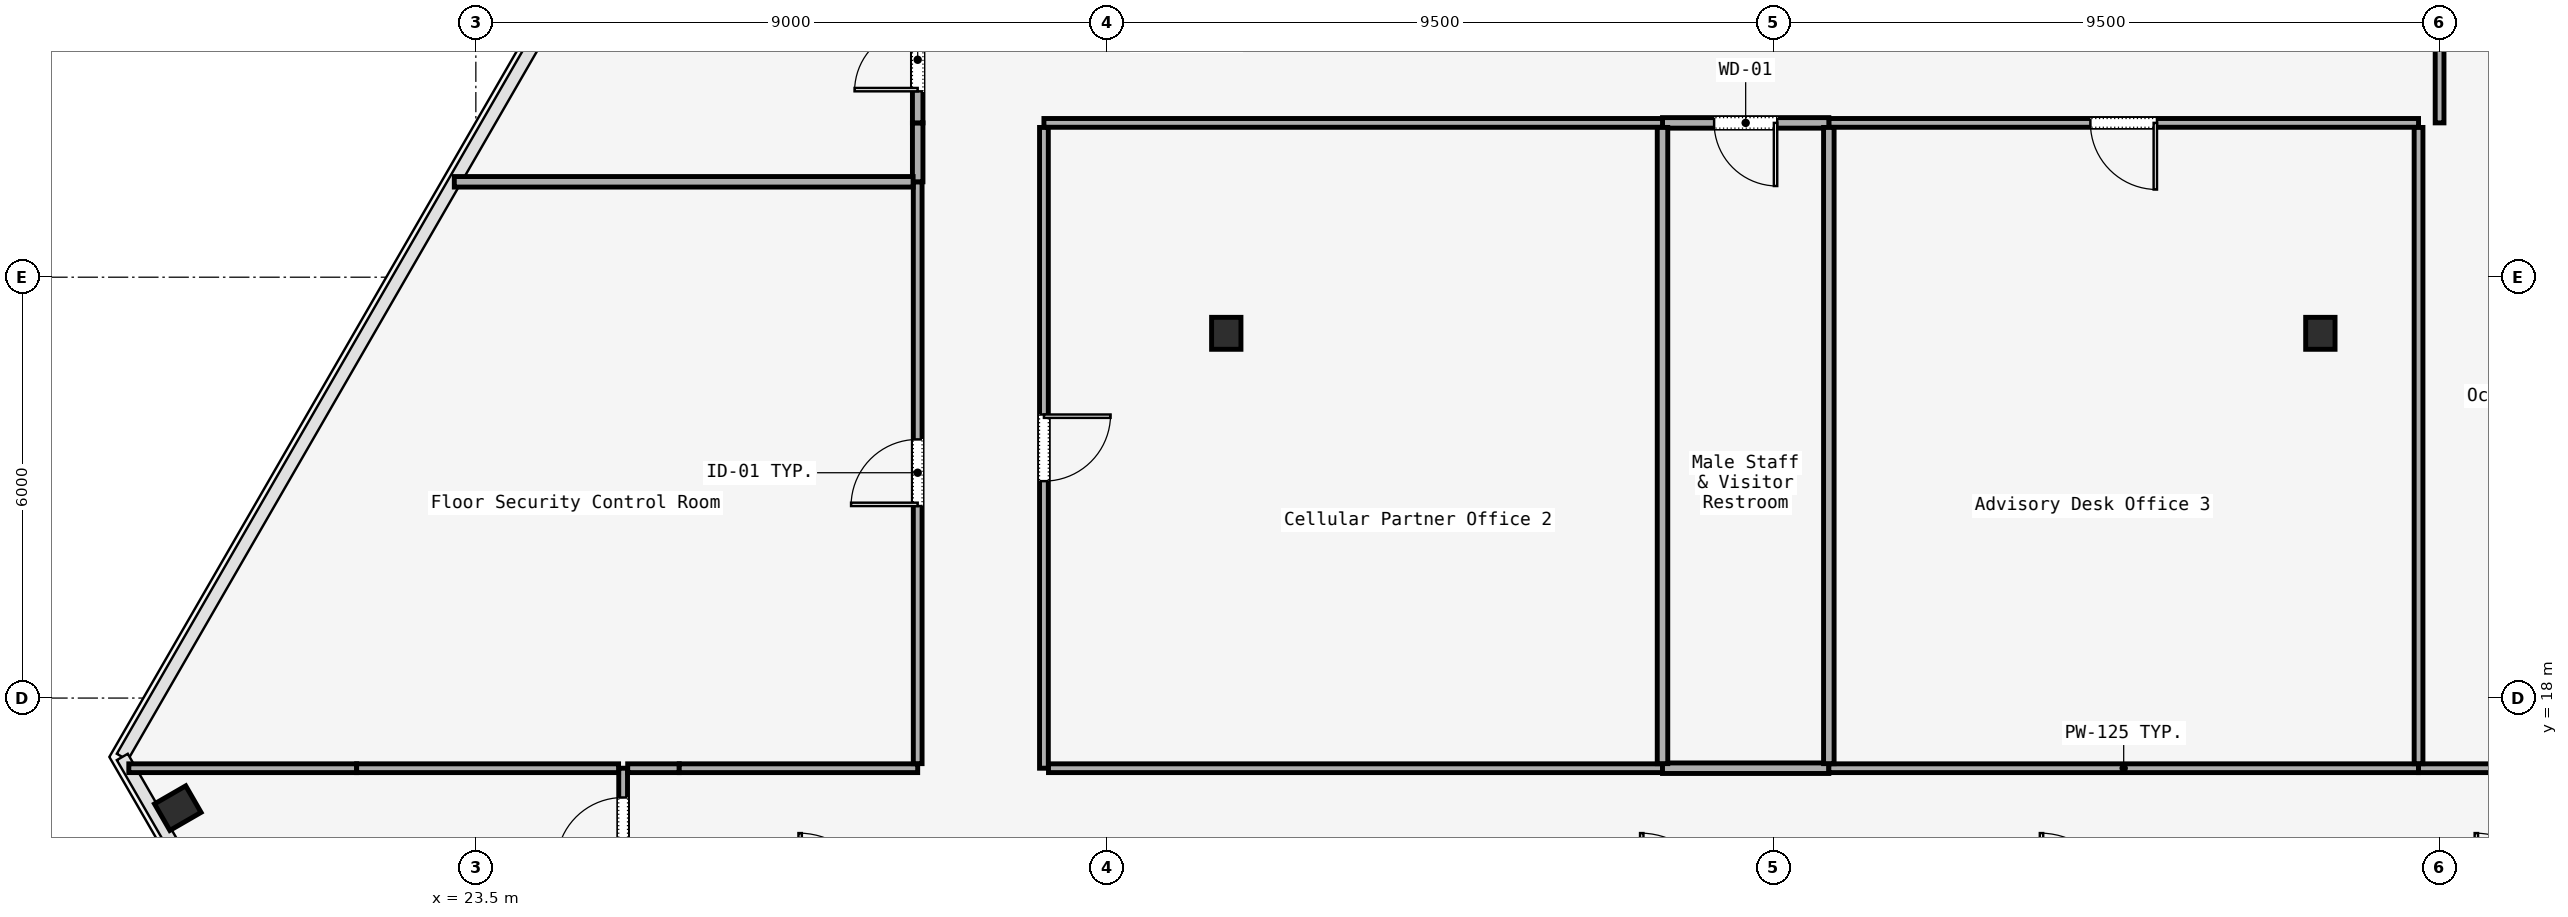
"""IFC4 building model, lengths in metres.
Left out: names, types, materials, properties, quantities, classifications, styles, units other than length and angle.
Written with IfcOpenShell. Run it as: python <this file> out.ifc"""

import sys

from ifc_helpers import new_model, si_unit, direction, frame, frame_2d, origin, origin_2d, place, context, subcontext, project, spatial, rectangle, i_section, extrude, element, fill, save


model = new_model("IFC4")
c1 = context("Model", 3, precision=1e-05, world=origin(), true_north=direction((0.0, 1.0)))
c2 = subcontext(c1, "Body", "Model", "MODEL_VIEW")
j1 = project(units=[si_unit("LENGTHUNIT", "METRE"), si_unit("PLANEANGLEUNIT", "RADIAN")], contexts=[c1])
p1 = place(None, origin())
s1 = spatial("IfcSite", under=j1, at=p1, CompositionType="ELEMENT")
p2 = place(p1, origin())
s2 = spatial("IfcBuilding", under=s1, at=p2, CompositionType="ELEMENT")
p3 = place(p2, frame((0.0, 0.0, 96.8)))
s3 = spatial("IfcBuildingStorey", under=s2, at=p3, CompositionType="ELEMENT", Elevation=96.8)
for number, where, z_axis, x_axis in (
    (1, (34.2, 23.2, 0.0), (0.0, 0.0, 1.0), (1.0, 0.0, 0.0)),
    (2, (49.8, 23.2, 0.0), (0.0, 0.0, 1.0), (1.0, 0.0, 0.0)),
):
    element("IfcColumn", number, at=place(p3, frame(where, z_axis=z_axis, x_axis=x_axis)), inside=s3, PredefinedType="COLUMN", context=c2, shape_type="SweptSolid", body=[
        extrude(i_section(OverallWidth=0.418, OverallDepth=0.456, WebThickness=0.042, FlangeThickness=0.067, FilletRadius=0.015, at=origin_2d()), origin(), (0.0, 0.0, 1.0), 3.58),
    ])
p4 = place(p3, frame((19.25, 16.431, 0.0), z_axis=(-0.007813879948, -0.085544998738, 0.996303666796), x_axis=(-0.419441460984, 0.904729024715, 0.074392557737)))
e3 = element("IfcColumn", 3, at=p4, inside=s3, PredefinedType="COLUMN", context=c2, shape_type="SweptSolid", body=[
    extrude(i_section(OverallWidth=0.437, OverallDepth=0.514, WebThickness=0.061, FlangeThickness=0.077, FilletRadius=0.015, at=origin_2d()), origin(), (0.0, 0.0, 1.0), 3.593),
])
p5 = place(p3, frame((25.6, 15.215, 0.0), z_axis=(0.0, 0.0, 1.0), x_axis=(0.0, 1.0, 0.0)))
e4 = element("IfcWall", 4, at=p5, inside=s3, PredefinedType="PARTITIONING", context=c2, shape_type="SweptSolid", body=[
    extrude(rectangle(XDim=1.785, YDim=0.125, at=frame_2d((0.893, 0.0))), origin(), (0.0, 0.0, 1.0), 2.95),
])
p6 = place(p5, frame((0.417, 0.0, 0.0)))
e5 = element("IfcOpeningElement", 5, at=p6, cuts=e4, PredefinedType="OPENING", context=c2, shape_type="SweptSolid", body=[
    extrude(rectangle(XDim=0.95, YDim=2.2, at=frame_2d((0.475, 1.1))), frame((0.0, 0.062, 0.0), z_axis=(0.0, -1.0, 0.0), x_axis=(1.0, 0.0, 0.0)), (0.0, 0.0, 1.0), 0.125),
])
p7 = place(p3, frame((25.665, 17.0, 0.0), z_axis=(0.0, 0.0, 1.0), x_axis=(1.0, 0.0, 0.0)))
e6 = element("IfcWall", 6, at=p7, inside=s3, PredefinedType="PARTITIONING", context=c2, shape_type="SweptSolid", body=[
    extrude(rectangle(XDim=0.735, YDim=0.125, at=frame_2d((0.367, 0.0))), origin(), (0.0, 0.0, 1.0), 2.95),
])
p8 = place(p3, frame((26.4, 17.0, 0.0), z_axis=(0.0, 0.0, 1.0), x_axis=(1.0, 0.0, 0.0)))
e7 = element("IfcWall", 7, at=p8, inside=s3, PredefinedType="PARTITIONING", context=c2, shape_type="SweptSolid", body=[
    extrude(rectangle(XDim=3.4, YDim=0.125, at=frame_2d((1.7, 0.0))), origin(), (0.0, 0.0, 1.0), 2.95),
])
p9 = place(p3, frame((29.8, 17.065, 0.0), z_axis=(0.0, 0.0, 1.0), x_axis=(0.0, 1.0, 0.0)))
e8 = element("IfcWall", 8, at=p9, inside=s3, PredefinedType="PARTITIONING", context=c2, shape_type="SweptSolid", body=[
    extrude(rectangle(XDim=8.295, YDim=0.125, at=frame_2d((4.147, 0.0))), origin(), (0.0, 0.0, 1.0), 2.95),
])
p10 = place(p9, frame((3.673, 0.0, 0.0)))
e9 = element("IfcOpeningElement", 9, at=p10, cuts=e8, PredefinedType="OPENING", context=c2, shape_type="SweptSolid", body=[
    extrude(rectangle(XDim=0.95, YDim=2.2, at=frame_2d((0.475, 1.1))), frame((0.0, 0.062, 0.0), z_axis=(0.0, -1.0, 0.0), x_axis=(1.0, 0.0, 0.0)), (0.0, 0.0, 1.0), 0.125),
])
p11 = place(p3, frame((29.8, 25.36, 0.0), z_axis=(0.0, 0.0, 1.0), x_axis=(0.0, 1.0, 0.0)))
e10 = element("IfcWall", 10, at=p11, inside=s3, PredefinedType="PARTITIONING", context=c2, shape_type="SweptSolid", body=[
    extrude(rectangle(XDim=0.84, YDim=0.15, at=frame_2d((0.42, 0.0))), origin(), (0.0, 0.0, 1.0), 2.95),
])
p12 = place(p3, frame((29.8, 26.2, 0.0), z_axis=(0.0, 0.0, 1.0), x_axis=(0.0, 1.0, 0.0)))
e11 = element("IfcWall", 11, at=p12, inside=s3, PredefinedType="PARTITIONING", context=c2, shape_type="SweptSolid", body=[
    extrude(rectangle(XDim=1.8, YDim=0.15, at=frame_2d((0.9, 0.0))), origin(), (0.0, 0.0, 1.0), 2.95),
])
p13 = place(p12, frame((0.45, 0.0, 0.0)))
e12 = element("IfcOpeningElement", 12, at=p13, cuts=e11, PredefinedType="OPENING", context=c2, shape_type="SweptSolid", body=[
    extrude(rectangle(XDim=0.9, YDim=2.15, at=frame_2d((0.45, 1.075))), frame((0.0, 0.075, 0.0), z_axis=(0.0, -1.0, 0.0), x_axis=(1.0, 0.0, 0.0)), (0.0, 0.0, 1.0), 0.15),
])
p14 = place(p3, frame((51.5, 27.935, 0.0), z_axis=(0.0, 0.0, 1.0), x_axis=(0.0, -1.0, 0.0)))
e13 = element("IfcWall", 13, at=p14, inside=s3, PredefinedType="PARTITIONING", context=c2, shape_type="SweptSolid", body=[
    extrude(rectangle(XDim=1.735, YDim=0.125, at=frame_2d((0.868, 0.0))), origin(), (0.0, 0.0, 1.0), 2.95),
])
p15 = place(p3, frame((51.2, 26.2, 0.0), z_axis=(0.0, 0.0, 1.0), x_axis=(-1.0, 0.0, 0.0)))
e14 = element("IfcWall", 14, at=p15, inside=s3, PredefinedType="PARTITIONING", context=c2, shape_type="SweptSolid", body=[
    extrude(rectangle(XDim=8.408, YDim=0.125, at=frame_2d((4.204, 0.0))), origin(), (0.0, 0.0, 1.0), 2.95),
])
p16 = place(p15, frame((3.729, 0.0, 0.0)))
e15 = element("IfcOpeningElement", 15, at=p16, cuts=e14, PredefinedType="OPENING", context=c2, shape_type="SweptSolid", body=[
    extrude(rectangle(XDim=0.95, YDim=2.2, at=frame_2d((0.475, 1.1))), frame((0.0, 0.062, 0.0), z_axis=(0.0, -1.0, 0.0), x_axis=(1.0, 0.0, 0.0)), (0.0, 0.0, 1.0), 0.125),
])
p17 = place(p3, frame((42.792, 26.2, 0.0), z_axis=(0.0, 0.0, 1.0), x_axis=(-1.0, 0.0, 0.0)))
e16 = element("IfcWall", 16, at=p17, inside=s3, PredefinedType="PARTITIONING", context=c2, shape_type="SweptSolid", body=[
    extrude(rectangle(XDim=2.372, YDim=0.15, at=frame_2d((1.186, 0.0))), origin(), (0.0, 0.0, 1.0), 2.95),
])
p18 = place(p17, frame((0.736, 0.0, 0.0)))
e17 = element("IfcOpeningElement", 17, at=p18, cuts=e16, PredefinedType="OPENING", context=c2, shape_type="SweptSolid", body=[
    extrude(rectangle(XDim=0.9, YDim=2.15, at=frame_2d((0.45, 1.075))), frame((0.0, 0.075, 0.0), z_axis=(0.0, -1.0, 0.0), x_axis=(1.0, 0.0, 0.0)), (0.0, 0.0, 1.0), 0.15),
])
p19 = place(p3, frame((40.42, 26.2, 0.0), z_axis=(0.0, 0.0, 1.0), x_axis=(-1.0, 0.0, 0.0)))
e18 = element("IfcWall", 18, at=p19, inside=s3, PredefinedType="PARTITIONING", context=c2, shape_type="SweptSolid", body=[
    extrude(rectangle(XDim=8.82, YDim=0.125, at=frame_2d((4.41, 0.0))), origin(), (0.0, 0.0, 1.0), 2.95),
])
p20 = place(p3, frame((31.6, 26.135, 0.0), z_axis=(0.0, 0.0, 1.0), x_axis=(0.0, -1.0, 0.0)))
e19 = element("IfcWall", 19, at=p20, inside=s3, PredefinedType="PARTITIONING", context=c2, shape_type="SweptSolid", body=[
    extrude(rectangle(XDim=9.135, YDim=0.125, at=frame_2d((4.567, 0.0))), origin(), (0.0, 0.0, 1.0), 2.95),
])
p21 = place(p20, frame((4.093, 0.0, 0.0)))
e20 = element("IfcOpeningElement", 20, at=p21, cuts=e19, PredefinedType="OPENING", context=c2, shape_type="SweptSolid", body=[
    extrude(rectangle(XDim=0.95, YDim=2.2, at=frame_2d((0.475, 1.1))), frame((0.0, 0.062, 0.0), z_axis=(0.0, -1.0, 0.0), x_axis=(1.0, 0.0, 0.0)), (0.0, 0.0, 1.0), 0.125),
])
p22 = place(p3, frame((31.665, 17.0, 0.0), z_axis=(0.0, 0.0, 1.0), x_axis=(1.0, 0.0, 0.0)))
e21 = element("IfcWall", 21, at=p22, inside=s3, PredefinedType="PARTITIONING", context=c2, shape_type="SweptSolid", body=[
    extrude(rectangle(XDim=8.755, YDim=0.125, at=frame_2d((4.377, 0.0))), origin(), (0.0, 0.0, 1.0), 2.95),
])
p23 = place(p3, frame((40.42, 17.0, 0.0), z_axis=(0.0, 0.0, 1.0), x_axis=(1.0, 0.0, 0.0)))
e22 = element("IfcWall", 22, at=p23, inside=s3, PredefinedType="PARTITIONING", context=c2, shape_type="SweptSolid", body=[
    extrude(rectangle(XDim=2.372, YDim=0.15, at=frame_2d((1.186, 0.0))), origin(), (0.0, 0.0, 1.0), 2.95),
])
p24 = place(p3, frame((42.792, 17.0, 0.0), z_axis=(0.0, 0.0, 1.0), x_axis=(1.0, 0.0, 0.0)))
e23 = element("IfcWall", 23, at=p24, inside=s3, PredefinedType="PARTITIONING", context=c2, shape_type="SweptSolid", body=[
    extrude(rectangle(XDim=8.408, YDim=0.125, at=frame_2d((4.204, 0.0))), origin(), (0.0, 0.0, 1.0), 2.95),
])
p25 = place(p3, frame((51.2, 17.0, 0.0), z_axis=(0.0, 0.0, 1.0), x_axis=(1.0, 0.0, 0.0)))
e24 = element("IfcWall", 24, at=p25, inside=s3, PredefinedType="PARTITIONING", context=c2, shape_type="SweptSolid", body=[
    extrude(rectangle(XDim=5.2, YDim=0.125, at=frame_2d((2.6, 0.0))), origin(), (0.0, 0.0, 1.0), 2.95),
])
p26 = place(p25, frame((2.125, 0.0, 0.0)))
e25 = element("IfcOpeningElement", 25, at=p26, cuts=e24, PredefinedType="OPENING", context=c2, shape_type="SweptSolid", body=[
    extrude(rectangle(XDim=0.95, YDim=2.2, at=frame_2d((0.475, 1.1))), frame((0.0, 0.062, 0.0), z_axis=(0.0, -1.0, 0.0), x_axis=(1.0, 0.0, 0.0)), (0.0, 0.0, 1.0), 0.125),
])
p27 = place(p3, frame((18.552, 17.0, 0.0), z_axis=(0.0, 0.0, 1.0), x_axis=(1.0, 0.0, 0.0)))
e26 = element("IfcWall", 26, at=p27, inside=s3, PredefinedType="PARTITIONING", context=c2, shape_type="SweptSolid", body=[
    extrude(rectangle(XDim=3.248, YDim=0.125, at=frame_2d((1.624, 0.0))), origin(), (0.0, 0.0, 1.0), 2.95),
])
p28 = place(p3, frame((21.8, 17.0, 0.0), z_axis=(0.0, 0.0, 1.0), x_axis=(1.0, 0.0, 0.0)))
e27 = element("IfcWall", 27, at=p28, inside=s3, PredefinedType="PARTITIONING", context=c2, shape_type="SweptSolid", body=[
    extrude(rectangle(XDim=3.735, YDim=0.125, at=frame_2d((1.867, 0.0))), origin(), (0.0, 0.0, 1.0), 2.95),
])
p29 = place(p3, frame((23.193, 25.36, 0.0), z_axis=(0.0, 0.0, 1.0), x_axis=(1.0, 0.0, 0.0)))
e28 = element("IfcWall", 28, at=p29, inside=s3, PredefinedType="PARTITIONING", context=c2, shape_type="SweptSolid", body=[
    extrude(rectangle(XDim=6.542, YDim=0.15, at=frame_2d((3.271, 0.0))), origin(), (0.0, 0.0, 1.0), 2.95),
])
for number, where, z_axis, x_axis in (
    (29, (40.42, 26.135, 0.0), (0.0, 0.0, 1.0), (0.0, -1.0, 0.0)),
    (30, (42.792, 26.135, 0.0), (0.0, 0.0, 1.0), (0.0, -1.0, 0.0)),
):
    element("IfcWall", number, at=place(p3, frame(where, z_axis=z_axis, x_axis=x_axis)), inside=s3, PredefinedType="PARTITIONING", context=c2, shape_type="SweptSolid", body=[
        extrude(rectangle(XDim=9.07, YDim=0.15, at=frame_2d((4.535, 0.0))), origin(), (0.0, 0.0, 1.0), 2.95),
    ])
p30 = place(p3, frame((51.2, 26.135, 0.0), z_axis=(0.0, 0.0, 1.0), x_axis=(0.0, -1.0, 0.0)))
e31 = element("IfcWall", 31, at=p30, inside=s3, PredefinedType="PARTITIONING", context=c2, shape_type="SweptSolid", body=[
    extrude(rectangle(XDim=9.07, YDim=0.125, at=frame_2d((4.535, 0.0))), origin(), (0.0, 0.0, 1.0), 2.95),
])
p31 = place(p6, origin())
e32 = element("IfcDoor", 32, at=p31, inside=s3, OperationType="SINGLE_SWING_LEFT", PredefinedType="DOOR", context=c2, shape_type="SweptSolid", body=[
    extrude(rectangle(XDim=0.95, YDim=2.2, at=frame_2d((0.475, 1.1))), frame((0.0, 0.025, 0.0), z_axis=(0.0, -1.0, 0.0), x_axis=(1.0, 0.0, 0.0)), (0.0, 0.0, 1.0), 0.05),
])
fill(e5, e32)
p32 = place(p10, origin())
e33 = element("IfcDoor", 33, at=p32, inside=s3, OperationType="SINGLE_SWING_LEFT", PredefinedType="DOOR", context=c2, shape_type="SweptSolid", body=[
    extrude(rectangle(XDim=0.95, YDim=2.2, at=frame_2d((0.475, 1.1))), frame((0.0, 0.025, 0.0), z_axis=(0.0, -1.0, 0.0), x_axis=(1.0, 0.0, 0.0)), (0.0, 0.0, 1.0), 0.05),
])
fill(e9, e33)
p33 = place(p21, origin())
e34 = element("IfcDoor", 34, at=p33, inside=s3, OperationType="SINGLE_SWING_LEFT", PredefinedType="DOOR", context=c2, shape_type="SweptSolid", body=[
    extrude(rectangle(XDim=0.95, YDim=2.2, at=frame_2d((0.475, 1.1))), frame((0.0, 0.025, 0.0), z_axis=(0.0, -1.0, 0.0), x_axis=(1.0, 0.0, 0.0)), (0.0, 0.0, 1.0), 0.05),
])
fill(e20, e34)
p34 = place(p18, origin())
e35 = element("IfcDoor", 35, at=p34, inside=s3, OperationType="SINGLE_SWING_RIGHT", PredefinedType="DOOR", context=c2, shape_type="SweptSolid", body=[
    extrude(rectangle(XDim=0.9, YDim=2.15, at=frame_2d((0.45, 1.075))), frame((0.0, 0.025, 0.0), z_axis=(0.0, -1.0, 0.0), x_axis=(1.0, 0.0, 0.0)), (0.0, 0.0, 1.0), 0.05),
])
fill(e17, e35)
p35 = place(p16, origin())
e36 = element("IfcDoor", 36, at=p35, inside=s3, OperationType="SINGLE_SWING_LEFT", PredefinedType="DOOR", context=c2, shape_type="SweptSolid", body=[
    extrude(rectangle(XDim=0.95, YDim=2.2, at=frame_2d((0.475, 1.1))), frame((0.0, 0.025, 0.0), z_axis=(0.0, -1.0, 0.0), x_axis=(1.0, 0.0, 0.0)), (0.0, 0.0, 1.0), 0.05),
])
fill(e15, e36)
p36 = place(p13, origin())
e37 = element("IfcDoor", 37, at=p36, inside=s3, OperationType="SINGLE_SWING_LEFT", PredefinedType="DOOR", context=c2, shape_type="SweptSolid", body=[
    extrude(rectangle(XDim=0.9, YDim=2.15, at=frame_2d((0.45, 1.075))), frame((0.0, 0.025, 0.0), z_axis=(0.0, -1.0, 0.0), x_axis=(1.0, 0.0, 0.0)), (0.0, 0.0, 1.0), 0.05),
])
fill(e12, e37)
save(model, sys.argv[1])
